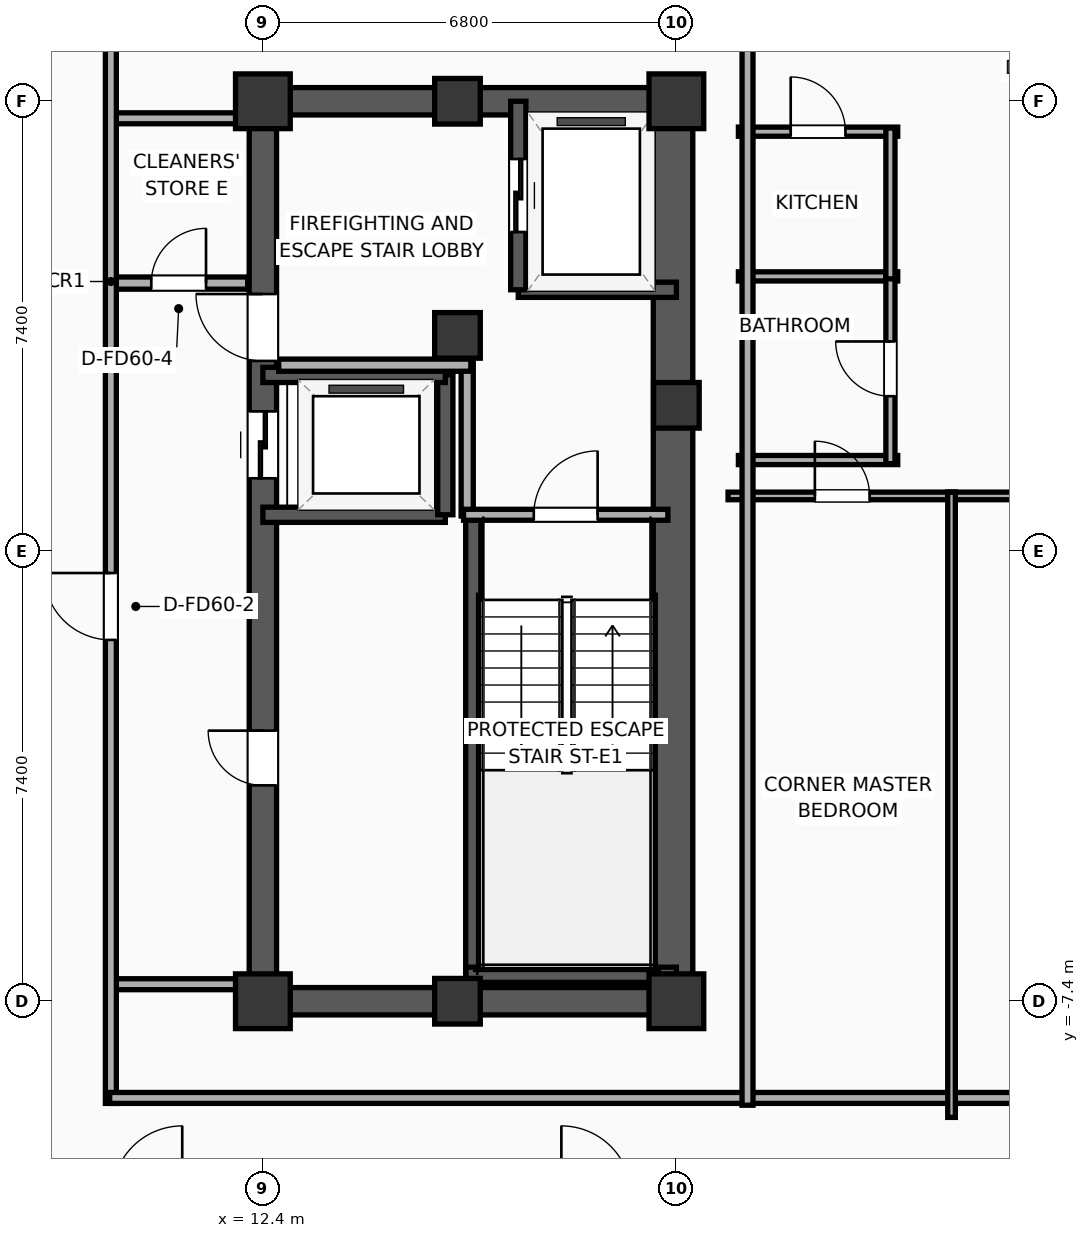
"""IFC4 building model, lengths in metres.
Left out: names, types, materials, properties, quantities, classifications, styles, units other than length and angle.
Written with IfcOpenShell. Run it as: python <this file> out.ifc"""

import sys

from ifc_helpers import new_model, si_unit, direction, frame, frame_2d, origin, origin_2d, place, context, subcontext, project, spatial, rectangle, extrude, element, fill, save


model = new_model("IFC4")
c1 = context("Model", 3, precision=1e-05, world=origin(), true_north=direction((0.0, 1.0)))
c2 = subcontext(c1, "Body", "Model", "MODEL_VIEW")
j1 = project(units=[si_unit("LENGTHUNIT", "METRE"), si_unit("PLANEANGLEUNIT", "RADIAN")], contexts=[c1])
p1 = place(None, origin())
s1 = spatial("IfcSite", under=j1, at=p1, CompositionType="ELEMENT")
p2 = place(p1, origin())
s2 = spatial("IfcBuilding", under=s1, at=p2, CompositionType="ELEMENT")
p3 = place(p2, frame((0.0, 0.0, 247.0)))
s3 = spatial("IfcBuildingStorey", under=s2, at=p3, CompositionType="ELEMENT", Elevation=247.0)
p4 = place(p3, frame((12.4, -7.4, 0.0), z_axis=(0.0, 0.0, 1.0), x_axis=(1.0, 0.0, 0.0)))
e1 = element("IfcColumn", 1, at=p4, inside=s3, PredefinedType="COLUMN", context=c2, shape_type="SweptSolid", body=[
    extrude(rectangle(XDim=0.9, YDim=0.9, at=origin_2d()), origin(), (0.0, 0.0, 1.0), 3.9),
])
p5 = place(p3, frame((15.6, 3.55, 0.0), z_axis=(0.0, 0.0, 1.0), x_axis=(1.0, 0.0, 0.0)))
e2 = element("IfcColumn", 2, at=p5, inside=s3, PredefinedType="COLUMN", context=c2, shape_type="SweptSolid", body=[
    extrude(rectangle(XDim=0.75, YDim=0.75, at=origin_2d()), origin(), (0.0, 0.0, 1.0), 3.9),
])
p6 = place(p3, frame((12.4, 7.4, 0.0), z_axis=(0.0, 0.0, 1.0), x_axis=(1.0, 0.0, 0.0)))
e3 = element("IfcColumn", 3, at=p6, inside=s3, PredefinedType="COLUMN", context=c2, shape_type="SweptSolid", body=[
    extrude(rectangle(XDim=0.9, YDim=0.9, at=origin_2d()), origin(), (0.0, 0.0, 1.0), 3.9),
])
for number, where, z_axis, x_axis in (
    (4, (15.6, -7.4, 0.0), (0.0, 0.0, 1.0), (1.0, 0.0, 0.0)),
    (5, (15.6, 7.4, 0.0), (0.0, 0.0, 1.0), (1.0, 0.0, 0.0)),
):
    element("IfcColumn", number, at=place(p3, frame(where, z_axis=z_axis, x_axis=x_axis)), inside=s3, PredefinedType="COLUMN", context=c2, shape_type="SweptSolid", body=[
        extrude(rectangle(XDim=0.75, YDim=0.75, at=origin_2d()), origin(), (0.0, 0.0, 1.0), 3.9),
    ])
p7 = place(p3, frame((19.2, -7.4, 0.0), z_axis=(0.0, 0.0, 1.0), x_axis=(1.0, 0.0, 0.0)))
e6 = element("IfcColumn", 6, at=p7, inside=s3, PredefinedType="COLUMN", context=c2, shape_type="SweptSolid", body=[
    extrude(rectangle(XDim=0.9, YDim=0.9, at=origin_2d()), origin(), (0.0, 0.0, 1.0), 3.9),
])
p8 = place(p3, frame((19.2, 2.4, 0.0), z_axis=(0.0, 0.0, 1.0), x_axis=(1.0, 0.0, 0.0)))
e7 = element("IfcColumn", 7, at=p8, inside=s3, PredefinedType="COLUMN", context=c2, shape_type="SweptSolid", body=[
    extrude(rectangle(XDim=0.75, YDim=0.75, at=origin_2d()), origin(), (0.0, 0.0, 1.0), 3.9),
])
p9 = place(p3, frame((19.2, 7.4, 0.0), z_axis=(0.0, 0.0, 1.0), x_axis=(1.0, 0.0, 0.0)))
e8 = element("IfcColumn", 8, at=p9, inside=s3, PredefinedType="COLUMN", context=c2, shape_type="SweptSolid", body=[
    extrude(rectangle(XDim=0.9, YDim=0.9, at=origin_2d()), origin(), (0.0, 0.0, 1.0), 3.9),
])
for number, where, z_axis, x_axis in (
    (9, (12.175, -7.4, 0.0), (0.0, 0.0, 1.0), (1.0, 0.0, 0.0)),
    (10, (12.175, 7.4, 0.0), (0.0, 0.0, 1.0), (1.0, 0.0, 0.0)),
):
    element("IfcWall", number, at=place(p3, frame(where, z_axis=z_axis, x_axis=x_axis)), inside=s3, PredefinedType="SHEAR", context=c2, shape_type="SweptSolid", body=[
        extrude(rectangle(XDim=7.25, YDim=0.45, at=frame_2d((3.625, 0.0))), origin(), (0.0, 0.0, 1.0), 3.65),
    ])
p10 = place(p3, frame((12.4, -7.4, 0.0), z_axis=(0.0, 0.0, 1.0), x_axis=(0.0, 1.0, 0.0)))
e11 = element("IfcWall", 11, at=p10, inside=s3, PredefinedType="SHEAR", context=c2, shape_type="SweptSolid", body=[
    extrude(rectangle(XDim=14.8, YDim=0.45, at=frame_2d((7.4, 0.0))), origin(), (0.0, 0.0, 1.0), 3.65),
])
p11 = place(p10, frame((8.6, 0.0, 0.0)))
e12 = element("IfcOpeningElement", 12, at=p11, cuts=e11, PredefinedType="OPENING", context=c2, shape_type="SweptSolid", body=[
    extrude(rectangle(XDim=1.1, YDim=2.05, at=frame_2d((0.55, 1.025))), frame((0.0, 0.235, 0.0), z_axis=(0.0, -1.0, 0.0), x_axis=(1.0, 0.0, 0.0)), (0.0, 0.0, 1.0), 0.47),
])
p12 = place(p10, frame((10.53, 0.0, 0.0)))
e13 = element("IfcOpeningElement", 13, at=p12, cuts=e11, PredefinedType="OPENING", context=c2, shape_type="SweptSolid", body=[
    extrude(rectangle(XDim=1.1, YDim=2.05, at=frame_2d((0.55, 1.025))), frame((0.0, 0.235, 0.0), z_axis=(0.0, -1.0, 0.0), x_axis=(1.0, 0.0, 0.0)), (0.0, 0.0, 1.0), 0.47),
])
p13 = place(p10, frame((3.55, 0.0, 0.0)))
e14 = element("IfcOpeningElement", 14, at=p13, cuts=e11, PredefinedType="OPENING", context=c2, shape_type="SweptSolid", body=[
    extrude(rectangle(XDim=0.9, YDim=2.05, at=frame_2d((0.45, 1.025))), frame((0.0, 0.235, 0.0), z_axis=(0.0, -1.0, 0.0), x_axis=(1.0, 0.0, 0.0)), (0.0, 0.0, 1.0), 0.47),
])
p14 = place(p3, frame((19.145, -7.4, 0.0), z_axis=(0.0, 0.0, 1.0), x_axis=(0.0, 1.0, 0.0)))
e15 = element("IfcWall", 15, at=p14, inside=s3, PredefinedType="SHEAR", context=c2, shape_type="SweptSolid", body=[
    extrude(rectangle(XDim=14.8, YDim=0.65, at=frame_2d((7.4, 0.0))), origin(), (0.0, 0.0, 1.0), 3.65),
])
p15 = place(p3, frame((15.86, -7.085, 0.0), z_axis=(0.0, 0.0, 1.0), x_axis=(0.0, 1.0, 0.0)))
e16 = element("IfcWall", 16, at=p15, inside=s3, PredefinedType="SOLIDWALL", context=c2, shape_type="SweptSolid", body=[
    extrude(rectangle(XDim=7.685, YDim=0.25, at=frame_2d((3.843, 0.0))), origin(), (0.0, 0.0, 1.0), 3.65),
])
p16 = place(p3, frame((15.74, -6.965, 0.0), z_axis=(0.0, 0.0, 1.0), x_axis=(1.0, 0.0, 0.0)))
e17 = element("IfcWall", 17, at=p16, inside=s3, PredefinedType="SOLIDWALL", context=c2, shape_type="SweptSolid", body=[
    extrude(rectangle(XDim=3.46, YDim=0.25, at=frame_2d((1.73, 0.0))), origin(), (0.0, 0.0, 1.0), 3.65),
])
p17 = place(p3, frame((16.6, 4.3, 0.0), z_axis=(0.0, 0.0, 1.0), x_axis=(1.0, 0.0, 0.0)))
e18 = element("IfcWall", 18, at=p17, inside=s3, PredefinedType="SOLIDWALL", context=c2, shape_type="SweptSolid", body=[
    extrude(rectangle(XDim=2.6, YDim=0.25, at=frame_2d((1.3, 0.0))), origin(), (0.0, 0.0, 1.0), 3.65),
])
p18 = place(p3, frame((16.6, 7.4, 0.0), z_axis=(0.0, 0.0, 1.0), x_axis=(0.0, -1.0, 0.0)))
e19 = element("IfcWall", 19, at=p18, inside=s3, PredefinedType="SOLIDWALL", context=c2, shape_type="SweptSolid", body=[
    extrude(rectangle(XDim=3.1, YDim=0.25, at=frame_2d((1.55, 0.0))), origin(), (0.0, 0.0, 1.0), 3.65),
])
p19 = place(p18, frame((0.95, 0.0, 0.0)))
e20 = element("IfcOpeningElement", 20, at=p19, cuts=e19, PredefinedType="OPENING", context=c2, shape_type="SweptSolid", body=[
    extrude(rectangle(XDim=1.2, YDim=2.05, at=frame_2d((0.6, 1.025))), frame((0.0, 0.135, 0.0), z_axis=(0.0, -1.0, 0.0), x_axis=(1.0, 0.0, 0.0)), (0.0, 0.0, 1.0), 0.27),
])
p20 = place(p3, frame((12.4, 0.6, 0.0), z_axis=(0.0, 0.0, 1.0), x_axis=(1.0, 0.0, 0.0)))
e21 = element("IfcWall", 21, at=p20, inside=s3, PredefinedType="SOLIDWALL", context=c2, shape_type="SweptSolid", body=[
    extrude(rectangle(XDim=3.0, YDim=0.25, at=frame_2d((1.5, 0.0))), origin(), (0.0, 0.0, 1.0), 3.65),
])
p21 = place(p3, frame((15.4, 0.6, 0.0), z_axis=(0.0, 0.0, 1.0), x_axis=(0.0, 1.0, 0.0)))
e22 = element("IfcWall", 22, at=p21, inside=s3, PredefinedType="SOLIDWALL", context=c2, shape_type="SweptSolid", body=[
    extrude(rectangle(XDim=2.3, YDim=0.25, at=frame_2d((1.15, 0.0))), origin(), (0.0, 0.0, 1.0), 3.65),
])
p22 = place(p3, frame((15.4, 2.9, 0.0), z_axis=(0.0, 0.0, 1.0), x_axis=(-1.0, 0.0, 0.0)))
e23 = element("IfcWall", 23, at=p22, inside=s3, PredefinedType="SOLIDWALL", context=c2, shape_type="SweptSolid", body=[
    extrude(rectangle(XDim=3.0, YDim=0.25, at=frame_2d((1.5, 0.0))), origin(), (0.0, 0.0, 1.0), 3.65),
])
p23 = place(p3, frame((15.76, 0.58, 0.0), z_axis=(0.0, 0.0, 1.0), x_axis=(0.0, 1.0, 0.0)))
e24 = element("IfcWall", 24, at=p23, inside=s3, PredefinedType="PARTITIONING", context=c2, shape_type="SweptSolid", body=[
    extrude(rectangle(XDim=2.52, YDim=0.2, at=frame_2d((1.26, 0.0))), origin(), (0.0, 0.0, 1.0), 3.65),
])
p24 = place(p3, frame((12.66, 3.06, 0.0), z_axis=(0.0, 0.0, 1.0), x_axis=(1.0, 0.0, 0.0)))
e25 = element("IfcWall", 25, at=p24, inside=s3, PredefinedType="PARTITIONING", context=c2, shape_type="SweptSolid", body=[
    extrude(rectangle(XDim=3.16, YDim=0.2, at=frame_2d((1.58, 0.0))), origin(), (0.0, 0.0, 1.0), 3.65),
])
p25 = place(p3, frame((15.7, 0.6, 0.0), z_axis=(0.0, 0.0, 1.0), x_axis=(1.0, 0.0, 0.0)))
e26 = element("IfcWall", 26, at=p25, inside=s3, PredefinedType="PARTITIONING", context=c2, shape_type="SweptSolid", body=[
    extrude(rectangle(XDim=3.36, YDim=0.18, at=frame_2d((1.68, 0.0))), origin(), (0.0, 0.0, 1.0), 3.65),
])
p26 = place(p25, frame((1.155, 0.0, 0.0)))
e27 = element("IfcOpeningElement", 27, at=p26, cuts=e26, PredefinedType="OPENING", context=c2, shape_type="SweptSolid", body=[
    extrude(rectangle(XDim=1.05, YDim=2.05, at=frame_2d((0.525, 1.025))), frame((0.0, 0.1, 0.0), z_axis=(0.0, -1.0, 0.0), x_axis=(1.0, 0.0, 0.0)), (0.0, 0.0, 1.0), 0.2),
])
p27 = place(p3, frame((9.88, 4.41, 0.0), z_axis=(0.0, 0.0, 1.0), x_axis=(1.0, 0.0, 0.0)))
e28 = element("IfcWall", 28, at=p27, inside=s3, PredefinedType="PARTITIONING", context=c2, shape_type="SweptSolid", body=[
    extrude(rectangle(XDim=2.27, YDim=0.2, at=frame_2d((1.135, 0.0))), origin(), (0.0, 0.0, 1.0), 3.65),
])
p28 = place(p27, frame((0.685, 0.0, 0.0)))
e29 = element("IfcOpeningElement", 29, at=p28, cuts=e28, PredefinedType="OPENING", context=c2, shape_type="SweptSolid", body=[
    extrude(rectangle(XDim=0.9, YDim=2.05, at=frame_2d((0.45, 1.025))), frame((0.0, 0.11, 0.0), z_axis=(0.0, -1.0, 0.0), x_axis=(1.0, 0.0, 0.0)), (0.0, 0.0, 1.0), 0.22),
])
for number, where, z_axis, x_axis in (
    (30, (9.88, 7.12, 0.0), (0.0, 0.0, 1.0), (1.0, 0.0, 0.0)),
    (31, (9.88, -7.12, 0.0), (0.0, 0.0, 1.0), (1.0, 0.0, 0.0)),
):
    element("IfcWall", number, at=place(p3, frame(where, z_axis=z_axis, x_axis=x_axis)), inside=s3, PredefinedType="PARTITIONING", context=c2, shape_type="SweptSolid", body=[
        extrude(rectangle(XDim=2.27, YDim=0.18, at=frame_2d((1.135, 0.0))), origin(), (0.0, 0.0, 1.0), 3.65),
    ])
p29 = place(p3, frame((9.9, -9.08, 0.0), z_axis=(0.0, 0.0, 1.0), x_axis=(0.0, 1.0, 0.0)))
e32 = element("IfcWall", 32, at=p29, inside=s3, PredefinedType="PARTITIONING", context=c2, shape_type="SweptSolid", body=[
    extrude(rectangle(XDim=18.16, YDim=0.18, at=frame_2d((9.08, 0.0))), origin(), (0.0, 0.0, 1.0), 3.65),
])
p30 = place(p29, frame((7.622, 0.0, 0.0)))
e33 = element("IfcOpeningElement", 33, at=p30, cuts=e32, PredefinedType="OPENING", context=c2, shape_type="SweptSolid", body=[
    extrude(rectangle(XDim=1.1, YDim=2.05, at=frame_2d((0.55, 1.025))), frame((0.0, 0.1, 0.0), z_axis=(0.0, -1.0, 0.0), x_axis=(1.0, 0.0, 0.0)), (0.0, 0.0, 1.0), 0.2),
])
p31 = place(p3, frame((9.88, -8.99, 0.0), z_axis=(0.0, 0.0, 1.0), x_axis=(1.0, 0.0, 0.0)))
e34 = element("IfcWall", 34, at=p31, inside=s3, PredefinedType="PARTITIONING", context=c2, shape_type="SweptSolid", body=[
    extrude(rectangle(XDim=20.35, YDim=0.18, at=frame_2d((10.175, 0.0))), origin(), (0.0, 0.0, 1.0), 3.65),
])
p32 = place(p3, frame((20.22, 6.9, 0.0), z_axis=(0.0, 0.0, 1.0), x_axis=(1.0, 0.0, 0.0)))
e35 = element("IfcWall", 35, at=p32, inside=s3, PredefinedType="PLUMBINGWALL", context=c2, shape_type="SweptSolid", body=[
    extrude(rectangle(XDim=2.62, YDim=0.15, at=frame_2d((1.31, 0.0))), origin(), (0.0, 0.0, 1.0), 3.65),
])
p33 = place(p32, frame((0.86, 0.0, 0.0)))
e36 = element("IfcOpeningElement", 36, at=p33, cuts=e35, PredefinedType="OPENING", context=c2, shape_type="SweptSolid", body=[
    extrude(rectangle(XDim=0.9, YDim=2.05, at=frame_2d((0.45, 1.025))), frame((0.0, 0.085, 0.0), z_axis=(0.0, -1.0, 0.0), x_axis=(1.0, 0.0, 0.0)), (0.0, 0.0, 1.0), 0.17),
])
for number, where, z_axis, x_axis in (
    (37, (20.22, 4.52, 0.0), (0.0, 0.0, 1.0), (1.0, 0.0, 0.0)),
    (38, (20.22, 1.5, 0.0), (0.0, 0.0, 1.0), (1.0, 0.0, 0.0)),
):
    element("IfcWall", number, at=place(p3, frame(where, z_axis=z_axis, x_axis=x_axis)), inside=s3, PredefinedType="PLUMBINGWALL", context=c2, shape_type="SweptSolid", body=[
        extrude(rectangle(XDim=2.62, YDim=0.15, at=frame_2d((1.31, 0.0))), origin(), (0.0, 0.0, 1.0), 3.65),
    ])
p34 = place(p3, frame((22.72, 1.44, 0.0), z_axis=(0.0, 0.0, 1.0), x_axis=(0.0, 1.0, 0.0)))
e39 = element("IfcWall", 39, at=p34, inside=s3, PredefinedType="PLUMBINGWALL", context=c2, shape_type="SweptSolid", body=[
    extrude(rectangle(XDim=3.12, YDim=0.15, at=frame_2d((1.56, 0.0))), origin(), (0.0, 0.0, 1.0), 3.65),
])
p35 = place(p34, frame((1.11, 0.0, 0.0)))
e40 = element("IfcOpeningElement", 40, at=p35, cuts=e39, PredefinedType="OPENING", context=c2, shape_type="SweptSolid", body=[
    extrude(rectangle(XDim=0.9, YDim=2.05, at=frame_2d((0.45, 1.025))), frame((0.0, 0.085, 0.0), z_axis=(0.0, -1.0, 0.0), x_axis=(1.0, 0.0, 0.0)), (0.0, 0.0, 1.0), 0.17),
])
p36 = place(p3, frame((22.72, 4.48, 0.0), z_axis=(0.0, 0.0, 1.0), x_axis=(0.0, 1.0, 0.0)))
e41 = element("IfcWall", 41, at=p36, inside=s3, PredefinedType="PLUMBINGWALL", context=c2, shape_type="SweptSolid", body=[
    extrude(rectangle(XDim=2.48, YDim=0.15, at=frame_2d((1.24, 0.0))), origin(), (0.0, 0.0, 1.0), 3.65),
])
p37 = place(p3, frame((20.05, 0.91, 0.0), z_axis=(0.0, 0.0, 1.0), x_axis=(1.0, 0.0, 0.0)))
e42 = element("IfcWall", 42, at=p37, inside=s3, PredefinedType="PARTITIONING", context=c2, shape_type="SweptSolid", body=[
    extrude(rectangle(XDim=3.738, YDim=0.125, at=frame_2d((1.869, 0.0))), origin(), (0.0, 0.0, 1.0), 3.65),
])
p38 = place(p37, frame((1.427, 0.0, 0.0)))
e43 = element("IfcOpeningElement", 43, at=p38, cuts=e42, PredefinedType="OPENING", context=c2, shape_type="SweptSolid", body=[
    extrude(rectangle(XDim=0.9, YDim=2.05, at=frame_2d((0.45, 1.025))), frame((0.0, 0.073, 0.0), z_axis=(0.0, -1.0, 0.0), x_axis=(1.0, 0.0, 0.0)), (0.0, 0.0, 1.0), 0.145),
])
p39 = place(p3, frame((23.663, 0.91, 0.0), z_axis=(0.0, 0.0, 1.0), x_axis=(1.0, 0.0, 0.0)))
e44 = element("IfcWall", 44, at=p39, inside=s3, PredefinedType="PARTITIONING", context=c2, shape_type="SweptSolid", body=[
    extrude(rectangle(XDim=3.381, YDim=0.125, at=frame_2d((1.69, 0.0))), origin(), (0.0, 0.0, 1.0), 3.65),
])
p40 = place(p39, frame((1.24, 0.0, 0.0)))
e45 = element("IfcOpeningElement", 45, at=p40, cuts=e44, PredefinedType="OPENING", context=c2, shape_type="SweptSolid", body=[
    extrude(rectangle(XDim=0.9, YDim=2.05, at=frame_2d((0.45, 1.025))), frame((0.0, 0.073, 0.0), z_axis=(0.0, -1.0, 0.0), x_axis=(1.0, 0.0, 0.0)), (0.0, 0.0, 1.0), 0.145),
])
p41 = place(p3, frame((23.725, -9.31, 0.0), z_axis=(0.0, 0.0, 1.0), x_axis=(0.0, 1.0, 0.0)))
e46 = element("IfcWall", 46, at=p41, inside=s3, PredefinedType="PARTITIONING", context=c2, shape_type="SweptSolid", body=[
    extrude(rectangle(XDim=10.28, YDim=0.125, at=frame_2d((5.14, 0.0))), origin(), (0.0, 0.0, 1.0), 3.65),
])
p42 = place(p3, frame((20.37, -9.11, 0.0), z_axis=(0.0, 0.0, 1.0), x_axis=(0.0, 1.0, 0.0)))
e47 = element("IfcWall", 47, at=p42, inside=s3, PredefinedType="PARTITIONING", context=c2, shape_type="SweptSolid", body=[
    extrude(rectangle(XDim=18.22, YDim=0.18, at=frame_2d((9.11, 0.0))), origin(), (0.0, 0.0, 1.0), 3.65),
])
p43 = place(p19, origin())
e48 = element("IfcDoor", 48, at=p43, inside=s3, OperationType="SLIDING_TO_LEFT", PredefinedType="DOOR", context=c2, shape_type="SweptSolid", body=[
    extrude(rectangle(XDim=1.2, YDim=2.05, at=frame_2d((0.6, 1.025))), frame((0.0, 0.025, 0.0), z_axis=(0.0, -1.0, 0.0), x_axis=(1.0, 0.0, 0.0)), (0.0, 0.0, 1.0), 0.05),
])
fill(e20, e48)
p44 = place(p11, origin())
e49 = element("IfcDoor", 49, at=p44, inside=s3, OperationType="SLIDING_TO_LEFT", PredefinedType="DOOR", context=c2, shape_type="SweptSolid", body=[
    extrude(rectangle(XDim=1.1, YDim=2.05, at=frame_2d((0.55, 1.025))), frame((0.0, 0.025, 0.0), z_axis=(0.0, -1.0, 0.0), x_axis=(1.0, 0.0, 0.0)), (0.0, 0.0, 1.0), 0.05),
])
fill(e12, e49)
p45 = place(p26, origin())
e50 = element("IfcDoor", 50, at=p45, inside=s3, OperationType="SINGLE_SWING_RIGHT", PredefinedType="DOOR", context=c2, shape_type="SweptSolid", body=[
    extrude(rectangle(XDim=1.05, YDim=2.05, at=frame_2d((0.525, 1.025))), frame((0.0, 0.025, 0.0), z_axis=(0.0, -1.0, 0.0), x_axis=(1.0, 0.0, 0.0)), (0.0, 0.0, 1.0), 0.05),
])
fill(e27, e50)
p46 = place(p28, origin())
e51 = element("IfcDoor", 51, at=p46, inside=s3, OperationType="SINGLE_SWING_RIGHT", PredefinedType="DOOR", context=c2, shape_type="SweptSolid", body=[
    extrude(rectangle(XDim=0.9, YDim=2.05, at=frame_2d((0.45, 1.025))), frame((0.0, 0.025, 0.0), z_axis=(0.0, -1.0, 0.0), x_axis=(1.0, 0.0, 0.0)), (0.0, 0.0, 1.0), 0.05),
])
fill(e29, e51)
p47 = place(p30, origin())
e52 = element("IfcDoor", 52, at=p47, inside=s3, OperationType="SINGLE_SWING_RIGHT", PredefinedType="DOOR", context=c2, shape_type="SweptSolid", body=[
    extrude(rectangle(XDim=1.1, YDim=2.05, at=frame_2d((0.55, 1.025))), frame((0.0, 0.025, 0.0), z_axis=(0.0, -1.0, 0.0), x_axis=(1.0, 0.0, 0.0)), (0.0, 0.0, 1.0), 0.05),
])
fill(e33, e52)
p48 = place(p33, origin())
e53 = element("IfcDoor", 53, at=p48, inside=s3, OperationType="SINGLE_SWING_LEFT", PredefinedType="DOOR", context=c2, shape_type="SweptSolid", body=[
    extrude(rectangle(XDim=0.9, YDim=2.05, at=frame_2d((0.45, 1.025))), frame((0.0, 0.025, 0.0), z_axis=(0.0, -1.0, 0.0), x_axis=(1.0, 0.0, 0.0)), (0.0, 0.0, 1.0), 0.05),
])
fill(e36, e53)
p49 = place(p35, origin())
e54 = element("IfcDoor", 54, at=p49, inside=s3, OperationType="SINGLE_SWING_RIGHT", PredefinedType="DOOR", context=c2, shape_type="SweptSolid", body=[
    extrude(rectangle(XDim=0.9, YDim=2.05, at=frame_2d((0.45, 1.025))), frame((0.0, 0.025, 0.0), z_axis=(0.0, -1.0, 0.0), x_axis=(1.0, 0.0, 0.0)), (0.0, 0.0, 1.0), 0.05),
])
fill(e40, e54)
p50 = place(p38, origin())
e55 = element("IfcDoor", 55, at=p50, inside=s3, OperationType="SINGLE_SWING_LEFT", PredefinedType="DOOR", context=c2, shape_type="SweptSolid", body=[
    extrude(rectangle(XDim=0.9, YDim=2.05, at=frame_2d((0.45, 1.025))), frame((0.0, 0.025, 0.0), z_axis=(0.0, -1.0, 0.0), x_axis=(1.0, 0.0, 0.0)), (0.0, 0.0, 1.0), 0.05),
])
fill(e43, e55)
p51 = place(p12, origin())
e56 = element("IfcDoor", 56, at=p51, inside=s3, OperationType="SINGLE_SWING_RIGHT", PredefinedType="DOOR", context=c2, shape_type="SweptSolid", body=[
    extrude(rectangle(XDim=1.1, YDim=2.05, at=frame_2d((0.55, 1.025))), frame((0.0, 0.025, 0.0), z_axis=(0.0, -1.0, 0.0), x_axis=(1.0, 0.0, 0.0)), (0.0, 0.0, 1.0), 0.05),
])
fill(e13, e56)
p52 = place(p13, origin())
e57 = element("IfcDoor", 57, at=p52, inside=s3, OperationType="SINGLE_SWING_RIGHT", PredefinedType="DOOR", context=c2, shape_type="SweptSolid", body=[
    extrude(rectangle(XDim=0.9, YDim=2.05, at=frame_2d((0.45, 1.025))), frame((0.0, 0.025, 0.0), z_axis=(0.0, -1.0, 0.0), x_axis=(1.0, 0.0, 0.0)), (0.0, 0.0, 1.0), 0.05),
])
fill(e14, e57)
save(model, sys.argv[1])
